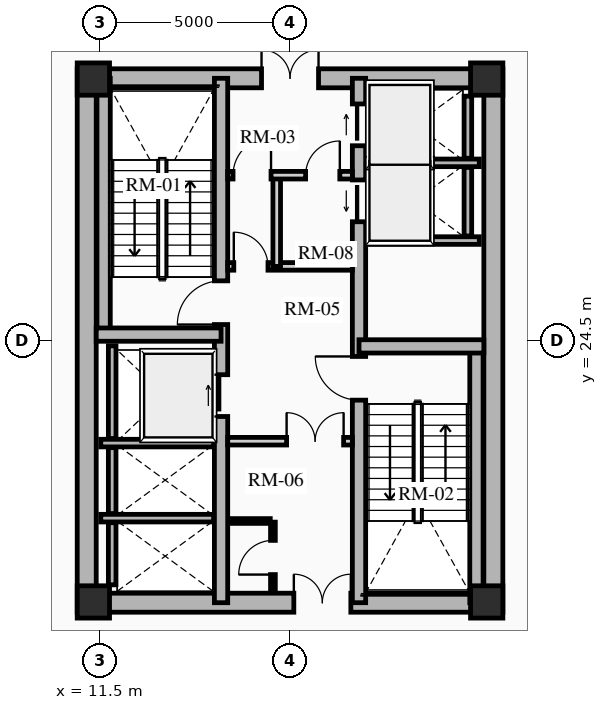
"""IFC4 building model, lengths in metres.
Left out: names, types, materials, properties, quantities, classifications, styles, units other than length and angle.
Written with IfcOpenShell. Run it as: python <this file> out.ifc"""

import sys

from ifc_helpers import new_model, si_unit, direction, frame, frame_2d, origin, origin_2d, place, context, subcontext, project, spatial, rectangle, extrude, source, transform, mapped, element, fill, save


model = new_model("IFC4")
c1 = context("Model", 3, precision=1e-05, world=origin(), true_north=direction((0.0, 1.0)))
c2 = subcontext(c1, "Body", "Model", "MODEL_VIEW")
j1 = project(units=[si_unit("LENGTHUNIT", "METRE"), si_unit("PLANEANGLEUNIT", "RADIAN")], contexts=[c1])
p1 = place(None, origin())
s1 = spatial("IfcSite", under=j1, at=p1, CompositionType="ELEMENT")
p2 = place(p1, origin())
s2 = spatial("IfcBuilding", under=s1, at=p2, CompositionType="ELEMENT")
p3 = place(p2, frame((0.0, 0.0, 4.8)))
s3 = spatial("IfcBuildingStorey", under=s2, at=p3, CompositionType="ELEMENT", Elevation=4.8)
for number, where, z_axis, x_axis in (
    (1, (11.15, 17.35, 0.0), (0.0, 0.0, 1.0), (0.0, 1.0, 0.0)),
    (2, (21.85, 17.35, 0.0), (0.0, 0.0, 1.0), (0.0, 1.0, 0.0)),
):
    element("IfcWall", number, at=place(p3, frame(where, z_axis=z_axis, x_axis=x_axis)), inside=s3, PredefinedType="SHEAR", context=c2, shape_type="SweptSolid", body=[
        extrude(rectangle(XDim=14.3, YDim=0.5, at=frame_2d((7.15, 0.0))), origin(), (0.0, 0.0, 1.0), 4.2),
    ])
p4 = place(p3, frame((11.15, 17.6, 0.0), z_axis=(0.0, 0.0, 1.0), x_axis=(1.0, 0.0, 0.0)))
e3 = element("IfcWall", 3, at=p4, inside=s3, PredefinedType="SHEAR", context=c2, shape_type="SweptSolid", body=[
    extrude(rectangle(XDim=10.7, YDim=0.5, at=frame_2d((5.35, 0.0))), origin(), (0.0, 0.0, 1.0), 4.2),
])
m1 = source(origin(), c2, "Body", "SweptSolid", [
    extrude(rectangle(XDim=1.5, YDim=2.02, at=frame_2d((0.75, 1.01))), frame((0.0, 0.26, 0.0), z_axis=(0.0, -1.0, 0.0), x_axis=(1.0, 0.0, 0.0)), (0.0, 0.0, 1.0), 0.52),
])
p5 = place(p4, frame((5.45, 0.0, 0.0)))
e4 = element("IfcOpeningElement", 4, at=p5, cuts=e3, PredefinedType="OPENING", context=c2, shape_type="MappedRepresentation", body=[
    mapped(m1, transform((0.0, 0.0, 0.0), x_axis=(1.0, 0.0, 0.0), y_axis=(0.0, 1.0, 0.0), z_axis=(0.0, 0.0, 1.0), scale=1.0)),
])
p6 = place(p3, frame((11.15, 31.4, 0.0), z_axis=(0.0, 0.0, 1.0), x_axis=(1.0, 0.0, 0.0)))
e5 = element("IfcWall", 5, at=p6, inside=s3, PredefinedType="SHEAR", context=c2, shape_type="SweptSolid", body=[
    extrude(rectangle(XDim=10.7, YDim=0.5, at=frame_2d((5.35, 0.0))), origin(), (0.0, 0.0, 1.0), 4.2),
])
p7 = place(p6, frame((4.6, 0.0, 0.0)))
e6 = element("IfcOpeningElement", 6, at=p7, cuts=e5, PredefinedType="OPENING", context=c2, shape_type="MappedRepresentation", body=[
    mapped(m1, transform((0.0, 0.0, 0.0), x_axis=(1.0, 0.0, 0.0), y_axis=(0.0, 1.0, 0.0), z_axis=(0.0, 0.0, 1.0), scale=1.0)),
])
p8 = place(p3, frame((14.685, 17.6, 0.0), z_axis=(0.0, 0.0, 1.0), x_axis=(0.0, 1.0, 0.0)))
e7 = element("IfcWall", 7, at=p8, inside=s3, PredefinedType="SHEAR", context=c2, shape_type="SweptSolid", body=[
    extrude(rectangle(XDim=13.8, YDim=0.35, at=frame_2d((6.9, 0.0))), origin(), (0.0, 0.0, 1.0), 4.2),
])
m2 = source(origin(), c2, "Body", "SweptSolid", [
    extrude(rectangle(XDim=1.1, YDim=2.015, at=frame_2d((0.55, 1.007))), frame((0.0, 0.185, 0.0), z_axis=(0.0, -1.0, 0.0), x_axis=(1.0, 0.0, 0.0)), (0.0, 0.0, 1.0), 0.37),
])
p9 = place(p8, frame((4.9, 0.0, 0.0)))
e8 = element("IfcOpeningElement", 8, at=p9, cuts=e7, PredefinedType="OPENING", context=c2, shape_type="MappedRepresentation", body=[
    mapped(m2, transform((0.0, 0.0, 0.0), x_axis=(1.0, 0.0, 0.0), y_axis=(0.0, 1.0, 0.0), z_axis=(0.0, 0.0, 1.0), scale=1.0)),
])
m3 = source(origin(), c2, "Body", "SweptSolid", [
    extrude(rectangle(XDim=1.15, YDim=2.02, at=frame_2d((0.575, 1.01))), frame((0.0, 0.185, 0.0), z_axis=(0.0, -1.0, 0.0), x_axis=(1.0, 0.0, 0.0)), (0.0, 0.0, 1.0), 0.37),
])
p10 = place(p8, frame((7.32, 0.0, 0.0)))
e9 = element("IfcOpeningElement", 9, at=p10, cuts=e7, PredefinedType="OPENING", context=c2, shape_type="MappedRepresentation", body=[
    mapped(m3, transform((0.0, 0.0, 0.0), x_axis=(1.0, 0.0, 0.0), y_axis=(0.0, 1.0, 0.0), z_axis=(0.0, 0.0, 1.0), scale=1.0)),
])
p11 = place(p3, frame((18.315, 17.6, 0.0), z_axis=(0.0, 0.0, 1.0), x_axis=(0.0, 1.0, 0.0)))
e10 = element("IfcWall", 10, at=p11, inside=s3, PredefinedType="SHEAR", context=c2, shape_type="SweptSolid", body=[
    extrude(rectangle(XDim=13.8, YDim=0.35, at=frame_2d((6.9, 0.0))), origin(), (0.0, 0.0, 1.0), 4.2),
])
p12 = place(p11, frame((10.025, 0.0, 0.0)))
e11 = element("IfcOpeningElement", 11, at=p12, cuts=e10, PredefinedType="OPENING", context=c2, shape_type="MappedRepresentation", body=[
    mapped(m2, transform((0.0, 0.0, 0.0), x_axis=(1.0, 0.0, 0.0), y_axis=(0.0, 1.0, 0.0), z_axis=(0.0, 0.0, 1.0), scale=1.0)),
])
p13 = place(p11, frame((12.025, 0.0, 0.0)))
e12 = element("IfcOpeningElement", 12, at=p13, cuts=e10, PredefinedType="OPENING", context=c2, shape_type="MappedRepresentation", body=[
    mapped(m2, transform((0.0, 0.0, 0.0), x_axis=(1.0, 0.0, 0.0), y_axis=(0.0, 1.0, 0.0), z_axis=(0.0, 0.0, 1.0), scale=1.0)),
])
p14 = place(p11, frame((5.33, 0.0, 0.0)))
e13 = element("IfcOpeningElement", 13, at=p14, cuts=e10, PredefinedType="OPENING", context=c2, shape_type="MappedRepresentation", body=[
    mapped(m3, transform((0.0, 0.0, 0.0), x_axis=(1.0, 0.0, 0.0), y_axis=(0.0, 1.0, 0.0), z_axis=(0.0, 0.0, 1.0), scale=1.0)),
])
p15 = place(p3, frame((11.595, 24.655, 0.0), z_axis=(0.0, 0.0, 1.0), x_axis=(0.0, 1.0, 0.0)))
e14 = element("IfcWall", 14, at=p15, inside=s3, PredefinedType="SHEAR", context=c2, shape_type="SweptSolid", body=[
    extrude(rectangle(XDim=6.745, YDim=0.35, at=frame_2d((3.373, 0.0))), origin(), (0.0, 0.0, 1.0), 4.2),
])
p16 = place(p3, frame((11.4, 24.655, 0.0), z_axis=(0.0, 0.0, 1.0), x_axis=(1.0, 0.0, 0.0)))
e15 = element("IfcWall", 15, at=p16, inside=s3, PredefinedType="SHEAR", context=c2, shape_type="SweptSolid", body=[
    extrude(rectangle(XDim=3.285, YDim=0.35, at=frame_2d((1.643, 0.0))), origin(), (0.0, 0.0, 1.0), 4.2),
])
p17 = place(p3, frame((21.405, 17.6, 0.0), z_axis=(0.0, 0.0, 1.0), x_axis=(0.0, 1.0, 0.0)))
e16 = element("IfcWall", 16, at=p17, inside=s3, PredefinedType="SHEAR", context=c2, shape_type="SweptSolid", body=[
    extrude(rectangle(XDim=6.745, YDim=0.35, at=frame_2d((3.373, 0.0))), origin(), (0.0, 0.0, 1.0), 4.2),
])
p18 = place(p3, frame((18.315, 24.345, 0.0), z_axis=(0.0, 0.0, 1.0), x_axis=(1.0, 0.0, 0.0)))
e17 = element("IfcWall", 17, at=p18, inside=s3, PredefinedType="SHEAR", context=c2, shape_type="SweptSolid", body=[
    extrude(rectangle(XDim=3.285, YDim=0.35, at=frame_2d((1.643, 0.0))), origin(), (0.0, 0.0, 1.0), 4.2),
])
for number, where, z_axis, x_axis in (
    (18, (11.325, 17.62, 0.0), (0.0, 0.0, 1.0), (1.0, 0.0, 0.0)),
    (19, (11.325, 31.38, 0.0), (0.0, 0.0, 1.0), (1.0, 0.0, 0.0)),
    (20, (21.675, 17.62, 0.0), (0.0, 0.0, 1.0), (1.0, 0.0, 0.0)),
    (21, (21.675, 31.38, 0.0), (0.0, 0.0, 1.0), (1.0, 0.0, 0.0)),
):
    element("IfcColumn", number, at=place(p3, frame(where, z_axis=z_axis, x_axis=x_axis)), inside=s3, PredefinedType="COLUMN", context=c2, shape_type="SweptSolid", body=[
        extrude(rectangle(XDim=0.85, YDim=0.85, at=origin_2d()), origin(), (0.0, 0.0, 1.0), 4.2),
    ])
p19 = place(p3, frame((11.52, 21.8, 0.0), z_axis=(0.0, 0.0, 1.0), x_axis=(1.0, 0.0, 0.0)))
e22 = element("IfcWall", 22, at=p19, inside=s3, PredefinedType="SHEAR", context=c2, shape_type="SweptSolid", body=[
    extrude(rectangle(XDim=2.97, YDim=0.2, at=frame_2d((1.485, 0.0))), origin(), (0.0, 0.0, 1.0), 4.2),
])
p20 = place(p3, frame((11.82, 21.92, 0.0), z_axis=(0.0, 0.0, 1.0), x_axis=(0.0, 1.0, 0.0)))
e23 = element("IfcWall", 23, at=p20, inside=s3, PredefinedType="SHEAR", context=c2, shape_type="SweptSolid", body=[
    extrude(rectangle(XDim=2.44, YDim=0.2, at=frame_2d((1.22, 0.0))), origin(), (0.0, 0.0, 1.0), 4.2),
])
p21 = place(p3, frame((11.52, 19.825, 0.0), z_axis=(0.0, 0.0, 1.0), x_axis=(1.0, 0.0, 0.0)))
e24 = element("IfcWall", 24, at=p21, inside=s3, PredefinedType="SHEAR", context=c2, shape_type="SweptSolid", body=[
    extrude(rectangle(XDim=2.97, YDim=0.2, at=frame_2d((1.485, 0.0))), origin(), (0.0, 0.0, 1.0), 4.2),
])
p22 = place(p3, frame((11.82, 19.945, 0.0), z_axis=(0.0, 0.0, 1.0), x_axis=(0.0, 1.0, 0.0)))
e25 = element("IfcWall", 25, at=p22, inside=s3, PredefinedType="SHEAR", context=c2, shape_type="SweptSolid", body=[
    extrude(rectangle(XDim=1.735, YDim=0.2, at=frame_2d((0.867, 0.0))), origin(), (0.0, 0.0, 1.0), 4.2),
])
p23 = place(p3, frame((11.82, 18.07, 0.0), z_axis=(0.0, 0.0, 1.0), x_axis=(0.0, 1.0, 0.0)))
e26 = element("IfcWall", 26, at=p23, inside=s3, PredefinedType="SHEAR", context=c2, shape_type="SweptSolid", body=[
    extrude(rectangle(XDim=1.635, YDim=0.2, at=frame_2d((0.817, 0.0))), origin(), (0.0, 0.0, 1.0), 4.2),
])
for number, where, z_axis, x_axis in (
    (27, (18.51, 27.13, 0.0), (0.0, 0.0, 1.0), (1.0, 0.0, 0.0)),
    (28, (18.51, 29.175, 0.0), (0.0, 0.0, 1.0), (1.0, 0.0, 0.0)),
):
    element("IfcWall", number, at=place(p3, frame(where, z_axis=z_axis, x_axis=x_axis)), inside=s3, PredefinedType="SHEAR", context=c2, shape_type="SweptSolid", body=[
        extrude(rectangle(XDim=2.97, YDim=0.2, at=frame_2d((1.485, 0.0))), origin(), (0.0, 0.0, 1.0), 4.2),
    ])
p24 = place(p3, frame((21.18, 27.25, 0.0), z_axis=(0.0, 0.0, 1.0), x_axis=(0.0, 1.0, 0.0)))
e29 = element("IfcWall", 29, at=p24, inside=s3, PredefinedType="SHEAR", context=c2, shape_type="SweptSolid", body=[
    extrude(rectangle(XDim=1.805, YDim=0.2, at=frame_2d((0.902, 0.0))), origin(), (0.0, 0.0, 1.0), 4.2),
])
p25 = place(p3, frame((21.18, 29.295, 0.0), z_axis=(0.0, 0.0, 1.0), x_axis=(0.0, 1.0, 0.0)))
e30 = element("IfcWall", 30, at=p25, inside=s3, PredefinedType="SHEAR", context=c2, shape_type="SweptSolid", body=[
    extrude(rectangle(XDim=1.635, YDim=0.2, at=frame_2d((0.817, 0.0))), origin(), (0.0, 0.0, 1.0), 4.2),
])
p26 = place(p3, frame((14.86, 21.85, 0.0), z_axis=(0.0, 0.0, 1.0), x_axis=(1.0, 0.0, 0.0)))
e31 = element("IfcWall", 31, at=p26, inside=s3, PredefinedType="PARTITIONING", context=c2, shape_type="SweptSolid", body=[
    extrude(rectangle(XDim=3.28, YDim=0.2, at=frame_2d((1.64, 0.0))), origin(), (0.0, 0.0, 1.0), 3.885),
])
m4 = source(origin(), c2, "Body", "SweptSolid", [
    extrude(rectangle(XDim=1.5, YDim=2.02, at=frame_2d((0.75, 1.01))), frame((0.0, 0.11, 0.0), z_axis=(0.0, -1.0, 0.0), x_axis=(1.0, 0.0, 0.0)), (0.0, 0.0, 1.0), 0.22),
])
p27 = place(p26, frame((1.55, 0.0, 0.0)))
e32 = element("IfcOpeningElement", 32, at=p27, cuts=e31, PredefinedType="OPENING", context=c2, shape_type="MappedRepresentation", body=[
    mapped(m4, transform((0.0, 0.0, 0.0), x_axis=(1.0, 0.0, 0.0), y_axis=(0.0, 1.0, 0.0), z_axis=(0.0, 0.0, 1.0), scale=1.0)),
])
p28 = place(p3, frame((14.86, 26.45, 0.0), z_axis=(0.0, 0.0, 1.0), x_axis=(1.0, 0.0, 0.0)))
e33 = element("IfcWall", 33, at=p28, inside=s3, PredefinedType="PARTITIONING", context=c2, shape_type="SweptSolid", body=[
    extrude(rectangle(XDim=3.28, YDim=0.2, at=frame_2d((1.64, 0.0))), origin(), (0.0, 0.0, 1.0), 3.885),
])
m5 = source(origin(), c2, "Body", "SweptSolid", [
    extrude(rectangle(XDim=0.9, YDim=2.005, at=frame_2d((0.45, 1.002))), frame((0.0, 0.11, 0.0), z_axis=(0.0, -1.0, 0.0), x_axis=(1.0, 0.0, 0.0)), (0.0, 0.0, 1.0), 0.22),
])
p29 = place(p28, frame((0.16, 0.0, 0.0)))
e34 = element("IfcOpeningElement", 34, at=p29, cuts=e33, PredefinedType="OPENING", context=c2, shape_type="MappedRepresentation", body=[
    mapped(m5, transform((0.0, 0.0, 0.0), x_axis=(1.0, 0.0, 0.0), y_axis=(0.0, 1.0, 0.0), z_axis=(0.0, 0.0, 1.0), scale=1.0)),
])
p30 = place(p3, frame((16.15, 26.45, 0.0), z_axis=(0.0, 0.0, 1.0), x_axis=(0.0, 1.0, 0.0)))
e35 = element("IfcWall", 35, at=p30, inside=s3, PredefinedType="PARTITIONING", context=c2, shape_type="SweptSolid", body=[
    extrude(rectangle(XDim=2.4, YDim=0.2, at=frame_2d((1.2, 0.0))), origin(), (0.0, 0.0, 1.0), 3.885),
])
p31 = place(p3, frame((14.86, 28.85, 0.0), z_axis=(0.0, 0.0, 1.0), x_axis=(1.0, 0.0, 0.0)))
e36 = element("IfcWall", 36, at=p31, inside=s3, PredefinedType="PARTITIONING", context=c2, shape_type="SweptSolid", body=[
    extrude(rectangle(XDim=3.28, YDim=0.2, at=frame_2d((1.64, 0.0))), origin(), (0.0, 0.0, 1.0), 3.885),
])
m6 = source(origin(), c2, "Body", "SweptSolid", [
    extrude(rectangle(XDim=1.0, YDim=2.015, at=frame_2d((0.5, 1.007))), frame((0.0, 0.11, 0.0), z_axis=(0.0, -1.0, 0.0), x_axis=(1.0, 0.0, 0.0)), (0.0, 0.0, 1.0), 0.22),
])
p32 = place(p31, frame((0.14, 0.0, 0.0)))
e37 = element("IfcOpeningElement", 37, at=p32, cuts=e36, PredefinedType="OPENING", context=c2, shape_type="MappedRepresentation", body=[
    mapped(m6, transform((0.0, 0.0, 0.0), x_axis=(1.0, 0.0, 0.0), y_axis=(0.0, 1.0, 0.0), z_axis=(0.0, 0.0, 1.0), scale=1.0)),
])
p33 = place(p31, frame((2.05, 0.0, 0.0)))
e38 = element("IfcOpeningElement", 38, at=p33, cuts=e36, PredefinedType="OPENING", context=c2, shape_type="MappedRepresentation", body=[
    mapped(m5, transform((0.0, 0.0, 0.0), x_axis=(1.0, 0.0, 0.0), y_axis=(0.0, 1.0, 0.0), z_axis=(0.0, 0.0, 1.0), scale=1.0)),
])
p34 = place(p3, frame((16.05, 17.92, 0.0), z_axis=(0.0, 0.0, 1.0), x_axis=(0.0, 1.0, 0.0)))
e39 = element("IfcWall", 39, at=p34, inside=s3, PredefinedType="PARTITIONING", context=c2, shape_type="SweptSolid", body=[
    extrude(rectangle(XDim=1.8, YDim=0.125, at=frame_2d((0.9, 0.0))), origin(), (0.0, 0.0, 1.0), 3.885),
])
m7 = source(origin(), c2, "Body", "SweptSolid", [
    extrude(rectangle(XDim=0.9, YDim=2.005, at=frame_2d((0.45, 1.002))), frame((0.0, 0.073, 0.0), z_axis=(0.0, -1.0, 0.0), x_axis=(1.0, 0.0, 0.0)), (0.0, 0.0, 1.0), 0.145),
])
p35 = place(p34, frame((0.42, 0.0, 0.0)))
e40 = element("IfcOpeningElement", 40, at=p35, cuts=e39, PredefinedType="OPENING", context=c2, shape_type="MappedRepresentation", body=[
    mapped(m7, transform((0.0, 0.0, 0.0), x_axis=(1.0, 0.0, 0.0), y_axis=(0.0, 1.0, 0.0), z_axis=(0.0, 0.0, 1.0), scale=1.0)),
])
p36 = place(p3, frame((14.88, 19.75, 0.0), z_axis=(0.0, 0.0, 1.0), x_axis=(1.0, 0.0, 0.0)))
e41 = element("IfcWall", 41, at=p36, inside=s3, PredefinedType="PARTITIONING", context=c2, shape_type="SweptSolid", body=[
    extrude(rectangle(XDim=1.1, YDim=0.125, at=frame_2d((0.55, 0.0))), origin(), (0.0, 0.0, 1.0), 3.885),
])
m8 = source(origin(), c2, "Body", "SweptSolid", [
    extrude(rectangle(XDim=1.1, YDim=2.015, at=frame_2d((0.55, 1.007))), frame((0.0, 0.025, 0.0), z_axis=(0.0, -1.0, 0.0), x_axis=(1.0, 0.0, 0.0)), (0.0, 0.0, 1.0), 0.05),
])
p37 = place(p9, origin())
e42 = element("IfcDoor", 42, at=p37, inside=s3, OperationType="SLIDING_TO_RIGHT", PredefinedType="DOOR", context=c2, shape_type="MappedRepresentation", body=[
    mapped(m8, transform((0.0, 0.0, 0.0), x_axis=(1.0, 0.0, 0.0), y_axis=(0.0, 1.0, 0.0), z_axis=(0.0, 0.0, 1.0), scale=1.0)),
])
fill(e8, e42)
p38 = place(p12, origin())
e43 = element("IfcDoor", 43, at=p38, inside=s3, OperationType="SLIDING_TO_LEFT", PredefinedType="DOOR", context=c2, shape_type="MappedRepresentation", body=[
    mapped(m8, transform((0.0, 0.0, 0.0), x_axis=(1.0, 0.0, 0.0), y_axis=(0.0, 1.0, 0.0), z_axis=(0.0, 0.0, 1.0), scale=1.0)),
])
fill(e11, e43)
p39 = place(p13, origin())
e44 = element("IfcDoor", 44, at=p39, inside=s3, OperationType="SLIDING_TO_RIGHT", PredefinedType="DOOR", context=c2, shape_type="MappedRepresentation", body=[
    mapped(m8, transform((0.0, 0.0, 0.0), x_axis=(1.0, 0.0, 0.0), y_axis=(0.0, 1.0, 0.0), z_axis=(0.0, 0.0, 1.0), scale=1.0)),
])
fill(e12, e44)
m9 = source(origin(), c2, "Body", "SweptSolid", [
    extrude(rectangle(XDim=1.15, YDim=2.02, at=frame_2d((0.575, 1.01))), frame((0.0, 0.025, 0.0), z_axis=(0.0, -1.0, 0.0), x_axis=(1.0, 0.0, 0.0)), (0.0, 0.0, 1.0), 0.05),
])
p40 = place(p10, origin())
e45 = element("IfcDoor", 45, at=p40, inside=s3, OperationType="SINGLE_SWING_LEFT", PredefinedType="DOOR", context=c2, shape_type="MappedRepresentation", body=[
    mapped(m9, transform((0.0, 0.0, 0.0), x_axis=(1.0, 0.0, 0.0), y_axis=(0.0, 1.0, 0.0), z_axis=(0.0, 0.0, 1.0), scale=1.0)),
])
fill(e9, e45)
p41 = place(p14, origin())
e46 = element("IfcDoor", 46, at=p41, inside=s3, OperationType="SINGLE_SWING_RIGHT", PredefinedType="DOOR", context=c2, shape_type="MappedRepresentation", body=[
    mapped(m9, transform((0.0, 0.0, 0.0), x_axis=(1.0, 0.0, 0.0), y_axis=(0.0, 1.0, 0.0), z_axis=(0.0, 0.0, 1.0), scale=1.0)),
])
fill(e13, e46)
m10 = source(origin(), c2, "Body", "SweptSolid", [
    extrude(rectangle(XDim=1.5, YDim=2.02, at=frame_2d((0.75, 1.01))), frame((0.0, 0.025, 0.0), z_axis=(0.0, -1.0, 0.0), x_axis=(1.0, 0.0, 0.0)), (0.0, 0.0, 1.0), 0.05),
])
p42 = place(p7, origin())
e47 = element("IfcDoor", 47, at=p42, inside=s3, OperationType="DOUBLE_DOOR_SINGLE_SWING", PredefinedType="DOOR", context=c2, shape_type="MappedRepresentation", body=[
    mapped(m10, transform((0.0, 0.0, 0.0), x_axis=(1.0, 0.0, 0.0), y_axis=(0.0, 1.0, 0.0), z_axis=(0.0, 0.0, 1.0), scale=1.0)),
])
fill(e6, e47)
p43 = place(p5, origin())
e48 = element("IfcDoor", 48, at=p43, inside=s3, OperationType="DOUBLE_DOOR_SINGLE_SWING", PredefinedType="DOOR", context=c2, shape_type="MappedRepresentation", body=[
    mapped(m10, transform((0.0, 0.0, 0.0), x_axis=(1.0, 0.0, 0.0), y_axis=(0.0, 1.0, 0.0), z_axis=(0.0, 0.0, 1.0), scale=1.0)),
])
fill(e4, e48)
p44 = place(p27, origin())
e49 = element("IfcDoor", 49, at=p44, inside=s3, OperationType="DOUBLE_DOOR_SINGLE_SWING", PredefinedType="DOOR", context=c2, shape_type="MappedRepresentation", body=[
    mapped(m10, transform((0.0, 0.0, 0.0), x_axis=(1.0, 0.0, 0.0), y_axis=(0.0, 1.0, 0.0), z_axis=(0.0, 0.0, 1.0), scale=1.0)),
])
fill(e32, e49)
m11 = source(origin(), c2, "Body", "SweptSolid", [
    extrude(rectangle(XDim=0.9, YDim=2.005, at=frame_2d((0.45, 1.002))), frame((0.0, 0.025, 0.0), z_axis=(0.0, -1.0, 0.0), x_axis=(1.0, 0.0, 0.0)), (0.0, 0.0, 1.0), 0.05),
])
p45 = place(p29, origin())
e50 = element("IfcDoor", 50, at=p45, inside=s3, OperationType="SINGLE_SWING_LEFT", PredefinedType="DOOR", context=c2, shape_type="MappedRepresentation", body=[
    mapped(m11, transform((0.0, 0.0, 0.0), x_axis=(1.0, 0.0, 0.0), y_axis=(0.0, 1.0, 0.0), z_axis=(0.0, 0.0, 1.0), scale=1.0)),
])
fill(e34, e50)
m12 = source(origin(), c2, "Body", "SweptSolid", [
    extrude(rectangle(XDim=1.0, YDim=2.015, at=frame_2d((0.5, 1.007))), frame((0.0, 0.025, 0.0), z_axis=(0.0, -1.0, 0.0), x_axis=(1.0, 0.0, 0.0)), (0.0, 0.0, 1.0), 0.05),
])
p46 = place(p32, origin())
e51 = element("IfcDoor", 51, at=p46, inside=s3, OperationType="SINGLE_SWING_RIGHT", PredefinedType="DOOR", context=c2, shape_type="MappedRepresentation", body=[
    mapped(m12, transform((0.0, 0.0, 0.0), x_axis=(1.0, 0.0, 0.0), y_axis=(0.0, 1.0, 0.0), z_axis=(0.0, 0.0, 1.0), scale=1.0)),
])
fill(e37, e51)
p47 = place(p35, origin())
e52 = element("IfcDoor", 52, at=p47, inside=s3, OperationType="SINGLE_SWING_LEFT", PredefinedType="DOOR", context=c2, shape_type="MappedRepresentation", body=[
    mapped(m11, transform((0.0, 0.0, 0.0), x_axis=(1.0, 0.0, 0.0), y_axis=(0.0, 1.0, 0.0), z_axis=(0.0, 0.0, 1.0), scale=1.0)),
])
fill(e40, e52)
p48 = place(p33, origin())
e53 = element("IfcDoor", 53, at=p48, inside=s3, OperationType="SINGLE_SWING_RIGHT", PredefinedType="DOOR", context=c2, shape_type="MappedRepresentation", body=[
    mapped(m11, transform((0.0, 0.0, 0.0), x_axis=(1.0, 0.0, 0.0), y_axis=(0.0, 1.0, 0.0), z_axis=(0.0, 0.0, 1.0), scale=1.0)),
])
fill(e38, e53)
save(model, sys.argv[1])
